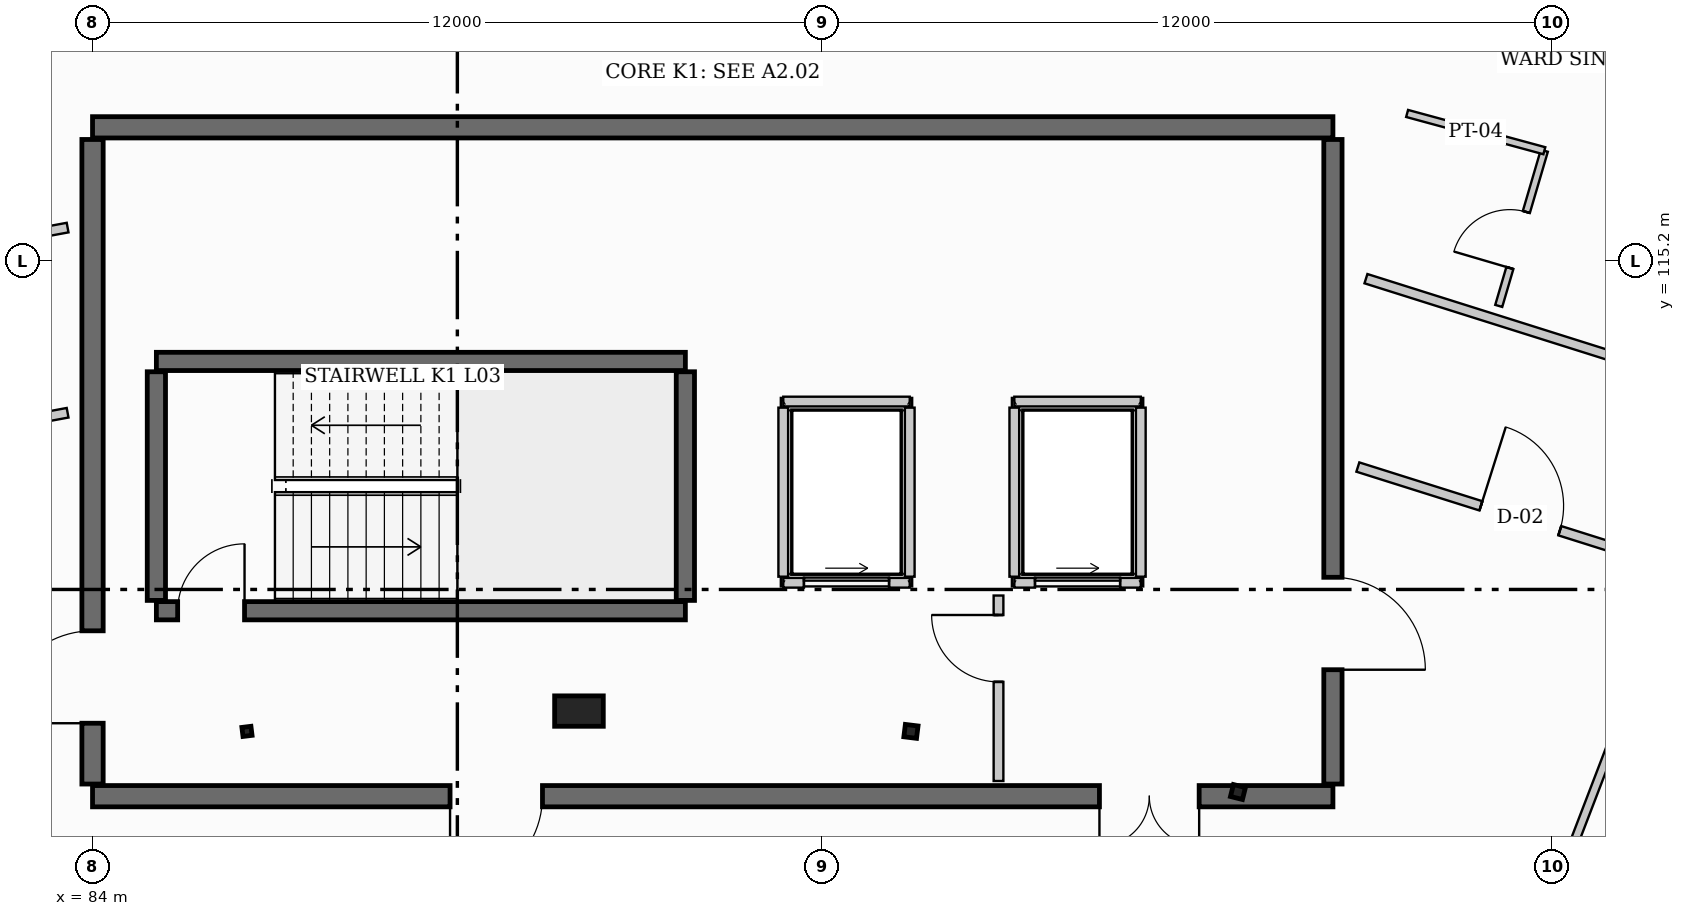
"""IFC4 building model, lengths in metres.
Left out: names, types, materials, properties, quantities, classifications, styles, units other than length and angle.
Written with IfcOpenShell. Run it as: python <this file> out.ifc"""

import sys

from ifc_helpers import new_model, si_unit, direction, frame, frame_2d, origin, origin_2d, place, context, subcontext, project, spatial, rectangle, hollow_rectangle, i_section, extrude, element, fill, save


model = new_model("IFC4")
c1 = context("Model", 3, precision=1e-05, world=origin(), true_north=direction((0.0, 1.0)))
c2 = subcontext(c1, "Body", "Model", "MODEL_VIEW")
j1 = project(units=[si_unit("LENGTHUNIT", "METRE"), si_unit("PLANEANGLEUNIT", "RADIAN")], contexts=[c1])
p1 = place(None, origin())
s1 = spatial("IfcSite", under=j1, at=p1, CompositionType="ELEMENT")
p2 = place(p1, origin())
s2 = spatial("IfcBuilding", under=s1, at=p2, CompositionType="ELEMENT")
p3 = place(p2, frame((0.0, 0.0, 14.4)))
s3 = spatial("IfcBuildingStorey", under=s2, at=p3, CompositionType="ELEMENT", Elevation=14.4)
p4 = place(p3, frame((86.54, 107.466, 0.0), z_axis=(0.0, 0.0, 1.0), x_axis=(-0.121869343405, 0.992546151641, 0.0)))
e1 = element("IfcColumn", 1, at=p4, inside=s3, PredefinedType="COLUMN", context=c2, shape_type="SweptSolid", body=[
    extrude(hollow_rectangle(XDim=0.15, YDim=0.15, WallThickness=0.008, at=origin_2d()), origin(), (0.0, 0.0, 1.0), 3.9),
])
p5 = place(p3, frame((92.0, 107.8, 0.0), z_axis=(0.0, 0.0, 1.0), x_axis=(0.0, 1.0, 0.0)))
e2 = element("IfcColumn", 2, at=p5, inside=s3, PredefinedType="PILASTER", context=c2, shape_type="SweptSolid", body=[
    extrude(rectangle(XDim=0.5, YDim=0.8, at=origin_2d()), origin(), (0.0, 0.0, 1.0), 3.9),
])
p6 = place(p3, frame((97.46, 107.466, 0.0), z_axis=(0.0, 0.0, 1.0), x_axis=(0.121869343405, 0.992546151641, 0.0)))
e3 = element("IfcColumn", 3, at=p6, inside=s3, PredefinedType="COLUMN", context=c2, shape_type="SweptSolid", body=[
    extrude(i_section(OverallWidth=0.205, OverallDepth=0.21, WebThickness=0.009, FlangeThickness=0.014, at=origin_2d()), origin(), (0.0, 0.0, 1.0), 3.9),
])
p7 = place(p3, frame((102.838, 106.469, 0.0), z_axis=(0.0, 0.0, 1.0), x_axis=(0.2419218956, 0.970295726276, 0.0)))
e4 = element("IfcColumn", 4, at=p7, inside=s3, PredefinedType="COLUMN", context=c2, shape_type="SweptSolid", body=[
    extrude(i_section(OverallWidth=0.203, OverallDepth=0.203, WebThickness=0.007, FlangeThickness=0.011, at=origin_2d()), origin(), (0.0, 0.0, 1.0), 3.9),
])
p8 = place(p3, frame((84.0, 117.4, 0.0), z_axis=(0.0, 0.0, 1.0), x_axis=(1.0, 0.0, 0.0)))
e5 = element("IfcWall", 5, at=p8, inside=s3, PredefinedType="SHEAR", context=c2, shape_type="SweptSolid", body=[
    extrude(rectangle(XDim=20.4, YDim=0.35, at=frame_2d((10.2, 0.0))), origin(), (0.0, 0.0, 1.0), 3.9),
])
p9 = place(p3, frame((104.4, 106.4, 0.0), z_axis=(0.0, 0.0, 1.0), x_axis=(-1.0, 0.0, 0.0)))
e6 = element("IfcWall", 6, at=p9, inside=s3, PredefinedType="SHEAR", context=c2, shape_type="SweptSolid", body=[
    extrude(rectangle(XDim=20.4, YDim=0.35, at=frame_2d((10.2, 0.0))), origin(), (0.0, 0.0, 1.0), 3.9),
])
p10 = place(p9, frame((2.2, 0.0, 0.0)))
e7 = element("IfcOpeningElement", 7, at=p10, cuts=e6, PredefinedType="OPENING", context=c2, shape_type="SweptSolid", body=[
    extrude(rectangle(XDim=1.64, YDim=2.2, at=frame_2d((0.82, 1.1))), frame((0.0, 0.185, 0.0), z_axis=(0.0, -1.0, 0.0), x_axis=(1.0, 0.0, 0.0)), (0.0, 0.0, 1.0), 0.37),
])
p11 = place(p9, frame((13.0, 0.0, 0.0)))
e8 = element("IfcOpeningElement", 8, at=p11, cuts=e6, PredefinedType="OPENING", context=c2, shape_type="SweptSolid", body=[
    extrude(rectangle(XDim=1.52, YDim=2.16, at=frame_2d((0.76, 1.08))), frame((0.0, 0.185, 0.0), z_axis=(0.0, -1.0, 0.0), x_axis=(1.0, 0.0, 0.0)), (0.0, 0.0, 1.0), 0.37),
])
p12 = place(p3, frame((84.0, 106.6, 0.0), z_axis=(0.0, 0.0, 1.0), x_axis=(0.0, 1.0, 0.0)))
e9 = element("IfcWall", 9, at=p12, inside=s3, PredefinedType="SHEAR", context=c2, shape_type="SweptSolid", body=[
    extrude(rectangle(XDim=10.6, YDim=0.35, at=frame_2d((5.3, 0.0))), origin(), (0.0, 0.0, 1.0), 3.9),
])
p13 = place(p12, frame((1.0, 0.0, 0.0)))
e10 = element("IfcOpeningElement", 10, at=p13, cuts=e9, PredefinedType="OPENING", context=c2, shape_type="SweptSolid", body=[
    extrude(rectangle(XDim=1.52, YDim=2.16, at=frame_2d((0.76, 1.08))), frame((0.0, 0.185, 0.0), z_axis=(0.0, -1.0, 0.0), x_axis=(1.0, 0.0, 0.0)), (0.0, 0.0, 1.0), 0.37),
])
p14 = place(p3, frame((104.4, 117.2, 0.0), z_axis=(0.0, 0.0, 1.0), x_axis=(0.0, -1.0, 0.0)))
e11 = element("IfcWall", 11, at=p14, inside=s3, PredefinedType="SHEAR", context=c2, shape_type="SweptSolid", body=[
    extrude(rectangle(XDim=10.6, YDim=0.3, at=frame_2d((5.3, 0.0))), origin(), (0.0, 0.0, 1.0), 3.9),
])
p15 = place(p14, frame((7.2, 0.0, 0.0)))
e12 = element("IfcOpeningElement", 12, at=p15, cuts=e11, PredefinedType="OPENING", context=c2, shape_type="SweptSolid", body=[
    extrude(rectangle(XDim=1.52, YDim=2.16, at=frame_2d((0.76, 1.08))), frame((0.0, 0.16, 0.0), z_axis=(0.0, -1.0, 0.0), x_axis=(1.0, 0.0, 0.0)), (0.0, 0.0, 1.0), 0.32),
])
p16 = place(p3, frame((85.05, 109.45, 0.0), z_axis=(0.0, 0.0, 1.0), x_axis=(1.0, 0.0, 0.0)))
e13 = element("IfcWall", 13, at=p16, inside=s3, PredefinedType="SHEAR", context=c2, shape_type="SweptSolid", body=[
    extrude(rectangle(XDim=8.7, YDim=0.3, at=frame_2d((4.35, 0.0))), origin(), (0.0, 0.0, 1.0), 3.9),
])
p17 = place(p16, frame((0.35, 0.0, 0.0)))
e14 = element("IfcOpeningElement", 14, at=p17, cuts=e13, PredefinedType="OPENING", context=c2, shape_type="SweptSolid", body=[
    extrude(rectangle(XDim=1.1, YDim=2.15, at=frame_2d((0.55, 1.075))), frame((0.0, 0.16, 0.0), z_axis=(0.0, -1.0, 0.0), x_axis=(1.0, 0.0, 0.0)), (0.0, 0.0, 1.0), 0.32),
])
p18 = place(p3, frame((93.75, 113.55, 0.0), z_axis=(0.0, 0.0, 1.0), x_axis=(-1.0, 0.0, 0.0)))
e15 = element("IfcWall", 15, at=p18, inside=s3, PredefinedType="SHEAR", context=c2, shape_type="SweptSolid", body=[
    extrude(rectangle(XDim=8.7, YDim=0.3, at=frame_2d((4.35, 0.0))), origin(), (0.0, 0.0, 1.0), 3.9),
])
for number, where, z_axis, x_axis in (
    (16, (85.05, 109.62, 0.0), (0.0, 0.0, 1.0), (0.0, 1.0, 0.0)),
    (17, (93.75, 109.62, 0.0), (0.0, 0.0, 1.0), (0.0, 1.0, 0.0)),
):
    element("IfcWall", number, at=place(p3, frame(where, z_axis=z_axis, x_axis=x_axis)), inside=s3, PredefinedType="SHEAR", context=c2, shape_type="SweptSolid", body=[
        extrude(rectangle(XDim=3.76, YDim=0.3, at=frame_2d((1.88, 0.0))), origin(), (0.0, 0.0, 1.0), 3.9),
    ])
p19 = place(p3, frame((95.36, 109.91, 0.0), z_axis=(0.0, 0.0, 1.0), x_axis=(1.0, 0.0, 0.0)))
e18 = element("IfcWall", 18, at=p19, inside=s3, PredefinedType="PARTITIONING", context=c2, shape_type="SweptSolid", body=[
    extrude(rectangle(XDim=2.08, YDim=0.16, at=frame_2d((1.04, 0.0))), origin(), (0.0, 0.0, 1.0), 3.56),
])
p20 = place(p19, frame((0.34, 0.0, 0.0)))
e19 = element("IfcOpeningElement", 19, at=p20, cuts=e18, PredefinedType="OPENING", context=c2, shape_type="SweptSolid", body=[
    extrude(rectangle(XDim=1.4, YDim=2.2, at=frame_2d((0.7, 1.1))), frame((0.0, 0.09, 0.0), z_axis=(0.0, -1.0, 0.0), x_axis=(1.0, 0.0, 0.0)), (0.0, 0.0, 1.0), 0.18),
])
p21 = place(p3, frame((97.44, 112.89, 0.0), z_axis=(0.0, 0.0, 1.0), x_axis=(-1.0, 0.0, 0.0)))
e20 = element("IfcWall", 20, at=p21, inside=s3, PredefinedType="PARTITIONING", context=c2, shape_type="SweptSolid", body=[
    extrude(rectangle(XDim=2.08, YDim=0.16, at=frame_2d((1.04, 0.0))), origin(), (0.0, 0.0, 1.0), 3.56),
])
for number, where, z_axis, x_axis in (
    (21, (95.36, 112.79, 0.0), (0.0, 0.0, 1.0), (0.0, -1.0, 0.0)),
    (22, (97.44, 110.01, 0.0), (0.0, 0.0, 1.0), (0.0, 1.0, 0.0)),
):
    element("IfcWall", number, at=place(p3, frame(where, z_axis=z_axis, x_axis=x_axis)), inside=s3, PredefinedType="PARTITIONING", context=c2, shape_type="SweptSolid", body=[
        extrude(rectangle(XDim=2.78, YDim=0.16, at=frame_2d((1.39, 0.0))), origin(), (0.0, 0.0, 1.0), 3.56),
    ])
p22 = place(p3, frame((99.16, 109.91, 0.0), z_axis=(0.0, 0.0, 1.0), x_axis=(1.0, 0.0, 0.0)))
e23 = element("IfcWall", 23, at=p22, inside=s3, PredefinedType="PARTITIONING", context=c2, shape_type="SweptSolid", body=[
    extrude(rectangle(XDim=2.08, YDim=0.16, at=frame_2d((1.04, 0.0))), origin(), (0.0, 0.0, 1.0), 3.56),
])
p23 = place(p22, frame((0.34, 0.0, 0.0)))
e24 = element("IfcOpeningElement", 24, at=p23, cuts=e23, PredefinedType="OPENING", context=c2, shape_type="SweptSolid", body=[
    extrude(rectangle(XDim=1.4, YDim=2.2, at=frame_2d((0.7, 1.1))), frame((0.0, 0.09, 0.0), z_axis=(0.0, -1.0, 0.0), x_axis=(1.0, 0.0, 0.0)), (0.0, 0.0, 1.0), 0.18),
])
p24 = place(p3, frame((101.24, 112.89, 0.0), z_axis=(0.0, 0.0, 1.0), x_axis=(-1.0, 0.0, 0.0)))
e25 = element("IfcWall", 25, at=p24, inside=s3, PredefinedType="PARTITIONING", context=c2, shape_type="SweptSolid", body=[
    extrude(rectangle(XDim=2.08, YDim=0.16, at=frame_2d((1.04, 0.0))), origin(), (0.0, 0.0, 1.0), 3.56),
])
for number, where, z_axis, x_axis in (
    (26, (99.16, 112.79, 0.0), (0.0, 0.0, 1.0), (0.0, -1.0, 0.0)),
    (27, (101.24, 110.01, 0.0), (0.0, 0.0, 1.0), (0.0, 1.0, 0.0)),
):
    element("IfcWall", number, at=place(p3, frame(where, z_axis=z_axis, x_axis=x_axis)), inside=s3, PredefinedType="PARTITIONING", context=c2, shape_type="SweptSolid", body=[
        extrude(rectangle(XDim=2.78, YDim=0.16, at=frame_2d((1.39, 0.0))), origin(), (0.0, 0.0, 1.0), 3.56),
    ])
p25 = place(p3, frame((98.9, 106.65, 0.0), z_axis=(0.0, 0.0, 1.0), x_axis=(0.0, 1.0, 0.0)))
e28 = element("IfcWall", 28, at=p25, inside=s3, PredefinedType="PARTITIONING", context=c2, shape_type="SweptSolid", body=[
    extrude(rectangle(XDim=3.05, YDim=0.16, at=frame_2d((1.525, 0.0))), origin(), (0.0, 0.0, 1.0), 3.295),
])
p26 = place(p25, frame((1.63, 0.0, 0.0)))
e29 = element("IfcOpeningElement", 29, at=p26, cuts=e28, PredefinedType="OPENING", context=c2, shape_type="SweptSolid", body=[
    extrude(rectangle(XDim=1.1, YDim=2.15, at=frame_2d((0.55, 1.075))), frame((0.0, 0.09, 0.0), z_axis=(0.0, -1.0, 0.0), x_axis=(1.0, 0.0, 0.0)), (0.0, 0.0, 1.0), 0.18),
])
p27 = place(p3, frame((79.057, 114.911, 0.0), z_axis=(0.0, 0.0, 1.0), x_axis=(0.983258469263, 0.182216307235, 0.0)))
e30 = element("IfcWall", 30, at=p27, inside=s3, PredefinedType="PARTITIONING", context=c2, shape_type="SweptSolid", body=[
    extrude(rectangle(XDim=4.61, YDim=0.16, at=frame_2d((2.305, 0.0))), origin(), (0.0, 0.0, 1.0), 2.938),
])
p28 = place(p27, frame((1.655, 0.0, 0.0)))
e31 = element("IfcOpeningElement", 31, at=p28, cuts=e30, PredefinedType="OPENING", context=c2, shape_type="SweptSolid", body=[
    extrude(rectangle(XDim=0.9, YDim=2.1, at=frame_2d((0.45, 1.05))), frame((0.0, 0.09, 0.0), z_axis=(0.0, -1.0, 0.0), x_axis=(1.0, 0.0, 0.0)), (0.0, 0.0, 1.0), 0.18),
])
p29 = place(p3, frame((79.783, 112.0, 0.0), z_axis=(0.0, 0.0, 1.0), x_axis=(0.983234305922, 0.182346646962, 0.0)))
e32 = element("IfcWall", 32, at=p29, inside=s3, PredefinedType="PARTITIONING", context=c2, shape_type="SweptSolid", body=[
    extrude(rectangle(XDim=3.872, YDim=0.16, at=frame_2d((1.936, 0.0))), origin(), (0.0, 0.0, 1.0), 2.938),
])
p30 = place(p29, frame((1.286, 0.0, 0.0)))
e33 = element("IfcOpeningElement", 33, at=p30, cuts=e32, PredefinedType="OPENING", context=c2, shape_type="SweptSolid", body=[
    extrude(rectangle(XDim=0.92, YDim=2.04, at=frame_2d((0.46, 1.02))), frame((0.0, 0.09, 0.0), z_axis=(0.0, -1.0, 0.0), x_axis=(1.0, 0.0, 0.0)), (0.0, 0.0, 1.0), 0.18),
])
p31 = place(p3, frame((107.127, 114.463, 0.0), z_axis=(0.0, 0.0, 1.0), x_axis=(0.281962578993, 0.959425403066, 0.0)))
e34 = element("IfcWall", 34, at=p31, inside=s3, PredefinedType="PARTITIONING", context=c2, shape_type="SweptSolid", body=[
    extrude(rectangle(XDim=2.66, YDim=0.12, at=frame_2d((1.33, 0.0))), origin(), (0.0, 0.0, 1.0), 3.289),
])
p32 = place(p31, frame((0.65, 0.0, 0.0)))
e35 = element("IfcOpeningElement", 35, at=p32, cuts=e34, PredefinedType="OPENING", context=c2, shape_type="SweptSolid", body=[
    extrude(rectangle(XDim=0.96, YDim=2.06, at=frame_2d((0.48, 1.03))), frame((0.0, 0.07, 0.0), z_axis=(0.0, -1.0, 0.0), x_axis=(1.0, 0.0, 0.0)), (0.0, 0.0, 1.0), 0.14),
])
p33 = place(p3, frame((105.62, 117.628, 0.0), z_axis=(0.0, 0.0, 1.0), x_axis=(0.965030735715, -0.262136756532, 0.0)))
e36 = element("IfcWall", 36, at=p33, inside=s3, PredefinedType="PARTITIONING", context=c2, shape_type="SweptSolid", body=[
    extrude(rectangle(XDim=2.339, YDim=0.12, at=frame_2d((1.169, 0.0))), origin(), (0.0, 0.0, 1.0), 3.085),
])
p34 = place(p3, frame((104.943, 114.911, 0.0), z_axis=(0.0, 0.0, 1.0), x_axis=(0.953736183483, -0.30064479426, 0.0)))
e37 = element("IfcWall", 37, at=p34, inside=s3, PredefinedType="PARTITIONING", context=c2, shape_type="SweptSolid", body=[
    extrude(rectangle(XDim=6.532, YDim=0.16, at=frame_2d((3.266, 0.0))), origin(), (0.0, 0.0, 1.0), 3.085),
])
p35 = place(p34, frame((4.632, 0.0, 0.0)))
e38 = element("IfcOpeningElement", 38, at=p35, cuts=e37, PredefinedType="OPENING", context=c2, shape_type="SweptSolid", body=[
    extrude(rectangle(XDim=1.48, YDim=2.26, at=frame_2d((0.74, 1.13))), frame((0.0, 0.09, 0.0), z_axis=(0.0, -1.0, 0.0), x_axis=(1.0, 0.0, 0.0)), (0.0, 0.0, 1.0), 0.18),
])
p36 = place(p3, frame((104.81, 111.813, 0.0), z_axis=(0.0, 0.0, 1.0), x_axis=(0.953730291319, -0.300663485347, 0.0)))
e39 = element("IfcWall", 39, at=p36, inside=s3, PredefinedType="PARTITIONING", context=c2, shape_type="SweptSolid", body=[
    extrude(rectangle(XDim=5.544, YDim=0.16, at=frame_2d((2.772, 0.0))), origin(), (0.0, 0.0, 1.0), 3.088),
])
p37 = place(p36, frame((2.122, 0.0, 0.0)))
e40 = element("IfcOpeningElement", 40, at=p37, cuts=e39, PredefinedType="OPENING", context=c2, shape_type="SweptSolid", body=[
    extrude(rectangle(XDim=1.36, YDim=2.18, at=frame_2d((0.68, 1.09))), frame((0.0, 0.09, 0.0), z_axis=(0.0, -1.0, 0.0), x_axis=(1.0, 0.0, 0.0)), (0.0, 0.0, 1.0), 0.18),
])
p38 = place(p3, frame((110.098, 110.146, 0.0), z_axis=(0.0, 0.0, 1.0), x_axis=(-0.358410014332, -0.933564278251, 0.0)))
e41 = element("IfcWall", 41, at=p38, inside=s3, PredefinedType="PARTITIONING", context=c2, shape_type="SweptSolid", body=[
    extrude(rectangle(XDim=7.821, YDim=0.14, at=frame_2d((3.91, 0.0))), origin(), (0.0, 0.0, 1.0), 3.088),
])
p39 = place(p20, origin())
e42 = element("IfcDoor", 42, at=p39, inside=s3, OperationType="SLIDING_TO_LEFT", PredefinedType="DOOR", context=c2, shape_type="SweptSolid", body=[
    extrude(rectangle(XDim=1.4, YDim=2.2, at=frame_2d((0.7, 1.1))), frame((0.0, 0.025, 0.0), z_axis=(0.0, -1.0, 0.0), x_axis=(1.0, 0.0, 0.0)), (0.0, 0.0, 1.0), 0.05),
])
fill(e19, e42)
p40 = place(p23, origin())
e43 = element("IfcDoor", 43, at=p40, inside=s3, OperationType="SLIDING_TO_LEFT", PredefinedType="DOOR", context=c2, shape_type="SweptSolid", body=[
    extrude(rectangle(XDim=1.4, YDim=2.2, at=frame_2d((0.7, 1.1))), frame((0.0, 0.025, 0.0), z_axis=(0.0, -1.0, 0.0), x_axis=(1.0, 0.0, 0.0)), (0.0, 0.0, 1.0), 0.05),
])
fill(e24, e43)
p41 = place(p17, origin())
e44 = element("IfcDoor", 44, at=p41, inside=s3, OperationType="SINGLE_SWING_RIGHT", PredefinedType="DOOR", context=c2, shape_type="SweptSolid", body=[
    extrude(rectangle(XDim=1.1, YDim=2.15, at=frame_2d((0.55, 1.075))), frame((0.0, 0.025, 0.0), z_axis=(0.0, -1.0, 0.0), x_axis=(1.0, 0.0, 0.0)), (0.0, 0.0, 1.0), 0.05),
])
fill(e14, e44)
p42 = place(p10, origin())
e45 = element("IfcDoor", 45, at=p42, inside=s3, OperationType="DOUBLE_DOOR_SINGLE_SWING", PredefinedType="DOOR", context=c2, shape_type="SweptSolid", body=[
    extrude(rectangle(XDim=1.64, YDim=2.2, at=frame_2d((0.82, 1.1))), frame((0.0, 0.025, 0.0), z_axis=(0.0, -1.0, 0.0), x_axis=(1.0, 0.0, 0.0)), (0.0, 0.0, 1.0), 0.05),
])
fill(e7, e45)
p43 = place(p11, origin())
e46 = element("IfcDoor", 46, at=p43, inside=s3, OperationType="SINGLE_SWING_RIGHT", PredefinedType="DOOR", context=c2, shape_type="SweptSolid", body=[
    extrude(rectangle(XDim=1.52, YDim=2.16, at=frame_2d((0.76, 1.08))), frame((0.0, 0.025, 0.0), z_axis=(0.0, -1.0, 0.0), x_axis=(1.0, 0.0, 0.0)), (0.0, 0.0, 1.0), 0.05),
])
fill(e8, e46)
p44 = place(p13, origin())
e47 = element("IfcDoor", 47, at=p44, inside=s3, OperationType="SINGLE_SWING_LEFT", PredefinedType="DOOR", context=c2, shape_type="SweptSolid", body=[
    extrude(rectangle(XDim=1.52, YDim=2.16, at=frame_2d((0.76, 1.08))), frame((0.0, 0.025, 0.0), z_axis=(0.0, -1.0, 0.0), x_axis=(1.0, 0.0, 0.0)), (0.0, 0.0, 1.0), 0.05),
])
fill(e10, e47)
p45 = place(p15, origin())
e48 = element("IfcDoor", 48, at=p45, inside=s3, OperationType="SINGLE_SWING_RIGHT", PredefinedType="DOOR", context=c2, shape_type="SweptSolid", body=[
    extrude(rectangle(XDim=1.52, YDim=2.16, at=frame_2d((0.76, 1.08))), frame((0.0, 0.025, 0.0), z_axis=(0.0, -1.0, 0.0), x_axis=(1.0, 0.0, 0.0)), (0.0, 0.0, 1.0), 0.05),
])
fill(e12, e48)
p46 = place(p26, origin())
e49 = element("IfcDoor", 49, at=p46, inside=s3, OperationType="SINGLE_SWING_RIGHT", PredefinedType="DOOR", context=c2, shape_type="SweptSolid", body=[
    extrude(rectangle(XDim=1.1, YDim=2.15, at=frame_2d((0.55, 1.075))), frame((0.0, 0.025, 0.0), z_axis=(0.0, -1.0, 0.0), x_axis=(1.0, 0.0, 0.0)), (0.0, 0.0, 1.0), 0.05),
])
fill(e29, e49)
p47 = place(p32, origin())
e50 = element("IfcDoor", 50, at=p47, inside=s3, OperationType="SINGLE_SWING_LEFT", PredefinedType="DOOR", context=c2, shape_type="SweptSolid", body=[
    extrude(rectangle(XDim=0.96, YDim=2.06, at=frame_2d((0.48, 1.03))), frame((0.0, 0.025, 0.0), z_axis=(0.0, -1.0, 0.0), x_axis=(1.0, 0.0, 0.0)), (0.0, 0.0, 1.0), 0.05),
])
fill(e35, e50)
p48 = place(p37, origin())
e51 = element("IfcDoor", 51, at=p48, inside=s3, OperationType="SINGLE_SWING_LEFT", PredefinedType="DOOR", context=c2, shape_type="SweptSolid", body=[
    extrude(rectangle(XDim=1.36, YDim=2.18, at=frame_2d((0.68, 1.09))), frame((0.0, 0.025, 0.0), z_axis=(0.0, -1.0, 0.0), x_axis=(1.0, 0.0, 0.0)), (0.0, 0.0, 1.0), 0.05),
])
fill(e40, e51)
save(model, sys.argv[1])
